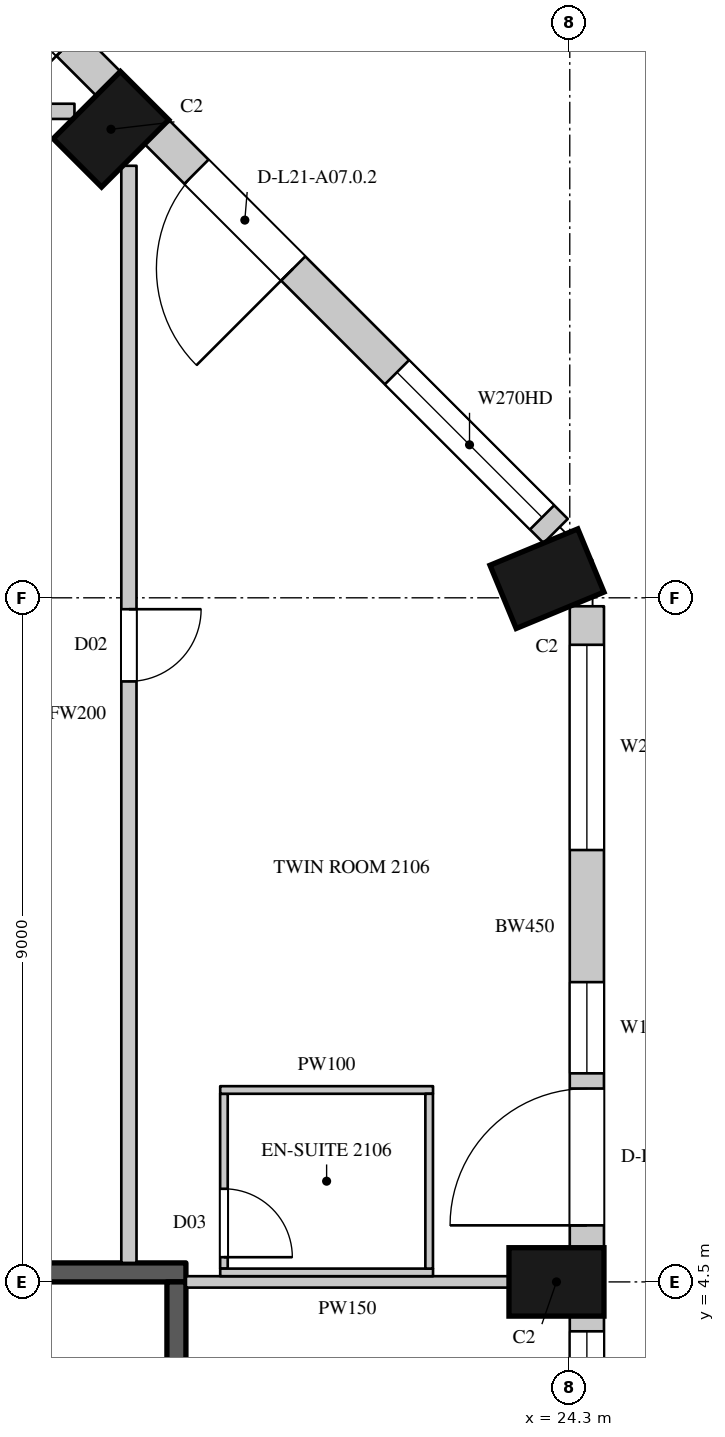
"""IFC4 building model, lengths in metres.
Left out: names, types, materials, properties, quantities, classifications, styles, units other than length and angle.
Written with IfcOpenShell. Run it as: python <this file> out.ifc"""

import sys

from ifc_helpers import new_model, si_unit, direction, frame, frame_2d, origin, origin_2d, place, context, subcontext, project, spatial, rectangle, extrude, element, fill, save


model = new_model("IFC4")
c1 = context("Model", 3, precision=1e-05, world=origin(), true_north=direction((0.0, 1.0)))
c2 = subcontext(c1, "Body", "Model", "MODEL_VIEW")
j1 = project(units=[si_unit("LENGTHUNIT", "METRE"), si_unit("PLANEANGLEUNIT", "RADIAN")], contexts=[c1])
p1 = place(None, origin())
s1 = spatial("IfcSite", under=j1, at=p1, CompositionType="ELEMENT")
p2 = place(p1, origin())
s2 = spatial("IfcBuilding", under=s1, at=p2, CompositionType="ELEMENT")
p3 = place(p2, frame((0.0, 0.0, 105.9)))
s3 = spatial("IfcBuildingStorey", under=s2, at=p3, CompositionType="ELEMENT", Elevation=105.9)
for number, where, z_axis, x_axis in (
    (1, (24.125, 4.5, 0.0), (0.0, 0.0, 1.0), (0.0, 1.0, 0.0)),
    (2, (24.0, 13.752, 0.0), (0.0, 0.0, 1.0), (-0.383, 0.924, 0.0)),
    (3, (18.264, 19.664, 0.0), (0.0, 0.0, 1.0), (-0.707, 0.707, 0.0)),
):
    element("IfcColumn", number, at=place(p3, frame(where, z_axis=z_axis, x_axis=x_axis)), inside=s3, PredefinedType="COLUMN", context=c2, shape_type="SweptSolid", body=[
        extrude(rectangle(XDim=0.9, YDim=1.25, at=origin_2d()), origin(), (0.0, 0.0, 1.0), 3.6),
    ])
p4 = place(p3, frame((24.525, -4.05, 0.0), z_axis=(0.0, 0.0, 1.0), x_axis=(0.0, 1.0, 0.0)))
e4 = element("IfcWall", 4, at=p4, inside=s3, PredefinedType="SOLIDWALL", context=c2, shape_type="SweptSolid", body=[
    extrude(rectangle(XDim=8.1, YDim=0.45, at=frame_2d((4.05, 0.0))), origin(), (0.0, 0.0, 1.0), 3.3),
])
p5 = place(p4, frame((0.2, 0.0, 0.0)))
e5 = element("IfcOpeningElement", 5, at=p5, cuts=e4, PredefinedType="OPENING", context=c2, shape_type="SweptSolid", body=[
    extrude(rectangle(XDim=1.8, YDim=2.4, at=frame_2d((0.9, 1.2))), frame((0.0, 0.235, 0.0), z_axis=(0.0, -1.0, 0.0), x_axis=(1.0, 0.0, 0.0)), (0.0, 0.0, 1.0), 0.47),
])
p6 = place(p4, frame((2.2, 0.0, 1.05)))
e6 = element("IfcOpeningElement", 6, at=p6, cuts=e4, PredefinedType="OPENING", context=c2, shape_type="SweptSolid", body=[
    extrude(rectangle(XDim=1.2, YDim=2.0, at=frame_2d((0.6, 1.0))), frame((0.0, 0.235, 0.0), z_axis=(0.0, -1.0, 0.0), x_axis=(1.0, 0.0, 0.0)), (0.0, 0.0, 1.0), 0.47),
])
p7 = place(p4, frame((4.7, 0.0, 0.0)))
e7 = element("IfcOpeningElement", 7, at=p7, cuts=e4, PredefinedType="OPENING", context=c2, shape_type="SweptSolid", body=[
    extrude(rectangle(XDim=1.8, YDim=2.4, at=frame_2d((0.9, 1.2))), frame((0.0, 0.235, 0.0), z_axis=(0.0, -1.0, 0.0), x_axis=(1.0, 0.0, 0.0)), (0.0, 0.0, 1.0), 0.47),
])
p8 = place(p4, frame((6.7, 0.0, 1.05)))
e8 = element("IfcOpeningElement", 8, at=p8, cuts=e4, PredefinedType="OPENING", context=c2, shape_type="SweptSolid", body=[
    extrude(rectangle(XDim=1.2, YDim=2.0, at=frame_2d((0.6, 1.0))), frame((0.0, 0.235, 0.0), z_axis=(0.0, -1.0, 0.0), x_axis=(1.0, 0.0, 0.0)), (0.0, 0.0, 1.0), 0.47),
])
p9 = place(p3, frame((24.525, 4.95, 0.0), z_axis=(0.0, 0.0, 1.0), x_axis=(0.0, 1.0, 0.0)))
e9 = element("IfcWall", 9, at=p9, inside=s3, PredefinedType="SOLIDWALL", context=c2, shape_type="SweptSolid", body=[
    extrude(rectangle(XDim=8.439, YDim=0.45, at=frame_2d((4.219, 0.0))), origin(), (0.0, 0.0, 1.0), 3.3),
])
p10 = place(p9, frame((0.294, 0.0, 0.0)))
e10 = element("IfcOpeningElement", 10, at=p10, cuts=e9, PredefinedType="OPENING", context=c2, shape_type="SweptSolid", body=[
    extrude(rectangle(XDim=1.8, YDim=2.4, at=frame_2d((0.9, 1.2))), frame((0.0, 0.235, 0.0), z_axis=(0.0, -1.0, 0.0), x_axis=(1.0, 0.0, 0.0)), (0.0, 0.0, 1.0), 0.47),
])
p11 = place(p9, frame((2.294, 0.0, 1.05)))
e11 = element("IfcOpeningElement", 11, at=p11, cuts=e9, PredefinedType="OPENING", context=c2, shape_type="SweptSolid", body=[
    extrude(rectangle(XDim=1.2, YDim=2.0, at=frame_2d((0.6, 1.0))), frame((0.0, 0.235, 0.0), z_axis=(0.0, -1.0, 0.0), x_axis=(1.0, 0.0, 0.0)), (0.0, 0.0, 1.0), 0.47),
])
p12 = place(p9, frame((5.232, 0.0, 1.05)))
e12 = element("IfcOpeningElement", 12, at=p12, cuts=e9, PredefinedType="OPENING", context=c2, shape_type="SweptSolid", body=[
    extrude(rectangle(XDim=2.7, YDim=2.0, at=frame_2d((1.35, 1.0))), frame((0.0, 0.235, 0.0), z_axis=(0.0, -1.0, 0.0), x_axis=(1.0, 0.0, 0.0)), (0.0, 0.0, 1.0), 0.47),
])
p13 = place(p3, frame((24.115, 14.379, 0.0), z_axis=(0.0, 0.0, 1.0), x_axis=(-0.707106781187, 0.707106781187, 0.0)))
e13 = element("IfcWall", 13, at=p13, inside=s3, PredefinedType="SOLIDWALL", context=c2, shape_type="SweptSolid", body=[
    extrude(rectangle(XDim=7.424, YDim=0.45, at=frame_2d((3.712, 0.0))), origin(), (0.0, 0.0, 1.0), 3.3),
])
p14 = place(p13, frame((0.253, 0.0, 1.05)))
e14 = element("IfcOpeningElement", 14, at=p14, cuts=e13, PredefinedType="OPENING", context=c2, shape_type="SweptSolid", body=[
    extrude(rectangle(XDim=2.7, YDim=2.0, at=frame_2d((1.35, 1.0))), frame((0.0, 0.235, 0.0), z_axis=(0.0, -1.0, 0.0), x_axis=(1.0, 0.0, 0.0)), (0.0, 0.0, 1.0), 0.47),
])
p15 = place(p13, frame((4.884, 0.0, 0.0)))
e15 = element("IfcOpeningElement", 15, at=p15, cuts=e13, PredefinedType="OPENING", context=c2, shape_type="SweptSolid", body=[
    extrude(rectangle(XDim=1.8, YDim=2.4, at=frame_2d((0.9, 1.2))), frame((0.0, 0.235, 0.0), z_axis=(0.0, -1.0, 0.0), x_axis=(1.0, 0.0, 0.0)), (0.0, 0.0, 1.0), 0.47),
])
p16 = place(p3, frame((18.229, 20.265, 0.0), z_axis=(0.0, 0.0, 1.0), x_axis=(-0.707106781187, 0.707106781187, 0.0)))
e16 = element("IfcWall", 16, at=p16, inside=s3, PredefinedType="SOLIDWALL", context=c2, shape_type="SweptSolid", body=[
    extrude(rectangle(XDim=7.424, YDim=0.45, at=frame_2d((3.712, 0.0))), origin(), (0.0, 0.0, 1.0), 3.3),
])
p17 = place(p16, frame((0.74, 0.0, 0.0)))
e17 = element("IfcOpeningElement", 17, at=p17, cuts=e16, PredefinedType="OPENING", context=c2, shape_type="SweptSolid", body=[
    extrude(rectangle(XDim=1.8, YDim=2.4, at=frame_2d((0.9, 1.2))), frame((0.0, 0.235, 0.0), z_axis=(0.0, -1.0, 0.0), x_axis=(1.0, 0.0, 0.0)), (0.0, 0.0, 1.0), 0.47),
])
p18 = place(p16, frame((4.471, 0.0, 1.05)))
e18 = element("IfcOpeningElement", 18, at=p18, cuts=e16, PredefinedType="OPENING", context=c2, shape_type="SweptSolid", body=[
    extrude(rectangle(XDim=2.7, YDim=2.0, at=frame_2d((1.35, 1.0))), frame((0.0, 0.235, 0.0), z_axis=(0.0, -1.0, 0.0), x_axis=(1.0, 0.0, 0.0)), (0.0, 0.0, 1.0), 0.47),
])
p19 = place(p3, frame((23.15, 16.864, 0.0), z_axis=(0.0, 0.0, 1.0), x_axis=(-0.707106781187, 0.707106781187, 0.0)))
e19 = element("IfcWall", 19, at=p19, inside=s3, PredefinedType="SOLIDWALL", context=c2, shape_type="SweptSolid", body=[
    extrude(rectangle(XDim=1.445, YDim=0.45, at=frame_2d((0.722, 0.0))), origin(), (0.0, 0.0, 1.0), 0.6),
])
p20 = place(p3, frame((19.937, 20.078, 0.0), z_axis=(0.0, 0.0, 1.0), x_axis=(-0.707106781187, 0.707106781187, 0.0)))
e20 = element("IfcWall", 20, at=p20, inside=s3, PredefinedType="SOLIDWALL", context=c2, shape_type="SweptSolid", body=[
    extrude(rectangle(XDim=1.781, YDim=0.45, at=frame_2d((0.89, 0.0))), origin(), (0.0, 0.0, 1.0), 0.6),
])
p21 = place(p3, frame((-23.822, 19.9, 0.0), z_axis=(0.0, 0.0, 1.0), x_axis=(1.0, 0.0, 0.0)))
e21 = element("IfcWall", 21, at=p21, inside=s3, PredefinedType="PARTITIONING", context=c2, shape_type="SweptSolid", body=[
    extrude(rectangle(XDim=41.605, YDim=0.2, at=frame_2d((20.803, 0.0))), origin(), (0.0, 0.0, 1.0), 3.3),
])
p22 = place(p21, frame((14.25, 0.0, 0.0)))
e22 = element("IfcOpeningElement", 22, at=p22, cuts=e21, PredefinedType="OPENING", context=c2, shape_type="SweptSolid", body=[
    extrude(rectangle(XDim=0.9, YDim=2.2, at=frame_2d((0.45, 1.1))), frame((0.0, 0.11, 0.0), z_axis=(0.0, -1.0, 0.0), x_axis=(1.0, 0.0, 0.0)), (0.0, 0.0, 1.0), 0.22),
])
p23 = place(p21, frame((27.1, 0.0, 0.0)))
e23 = element("IfcOpeningElement", 23, at=p23, cuts=e21, PredefinedType="OPENING", context=c2, shape_type="SweptSolid", body=[
    extrude(rectangle(XDim=0.9, YDim=2.2, at=frame_2d((0.45, 1.1))), frame((0.0, 0.11, 0.0), z_axis=(0.0, -1.0, 0.0), x_axis=(1.0, 0.0, 0.0)), (0.0, 0.0, 1.0), 0.22),
])
p24 = place(p21, frame((0.8, 0.0, 0.0)))
e24 = element("IfcOpeningElement", 24, at=p24, cuts=e21, PredefinedType="OPENING", context=c2, shape_type="SweptSolid", body=[
    extrude(rectangle(XDim=1.1, YDim=2.4, at=frame_2d((0.55, 1.2))), frame((0.0, 0.11, 0.0), z_axis=(0.0, -1.0, 0.0), x_axis=(1.0, 0.0, 0.0)), (0.0, 0.0, 1.0), 0.22),
])
p25 = place(p21, frame((23.2, 0.0, 0.0)))
e25 = element("IfcOpeningElement", 25, at=p25, cuts=e21, PredefinedType="OPENING", context=c2, shape_type="SweptSolid", body=[
    extrude(rectangle(XDim=0.95, YDim=2.2, at=frame_2d((0.475, 1.1))), frame((0.0, 0.11, 0.0), z_axis=(0.0, -1.0, 0.0), x_axis=(1.0, 0.0, 0.0)), (0.0, 0.0, 1.0), 0.22),
])
p26 = place(p21, frame((35.0, 0.0, 0.0)))
e26 = element("IfcOpeningElement", 26, at=p26, cuts=e21, PredefinedType="OPENING", context=c2, shape_type="SweptSolid", body=[
    extrude(rectangle(XDim=0.95, YDim=2.2, at=frame_2d((0.475, 1.1))), frame((0.0, 0.11, 0.0), z_axis=(0.0, -1.0, 0.0), x_axis=(1.0, 0.0, 0.0)), (0.0, 0.0, 1.0), 0.22),
])
p27 = place(p3, frame((18.5, 4.75, 0.0), z_axis=(0.0, 0.0, 1.0), x_axis=(0.0, 1.0, 0.0)))
e27 = element("IfcWall", 27, at=p27, inside=s3, PredefinedType="PARTITIONING", context=c2, shape_type="SweptSolid", body=[
    extrude(rectangle(XDim=14.434, YDim=0.2, at=frame_2d((7.217, 0.0))), origin(), (0.0, 0.0, 1.0), 3.3),
])
p28 = place(p27, frame((7.65, 0.0, 0.0)))
e28 = element("IfcOpeningElement", 28, at=p28, cuts=e27, PredefinedType="OPENING", context=c2, shape_type="SweptSolid", body=[
    extrude(rectangle(XDim=0.95, YDim=2.2, at=frame_2d((0.475, 1.1))), frame((0.0, 0.11, 0.0), z_axis=(0.0, -1.0, 0.0), x_axis=(1.0, 0.0, 0.0)), (0.0, 0.0, 1.0), 0.22),
])
p29 = place(p3, frame((19.25, 4.5, 0.0), z_axis=(0.0, 0.0, 1.0), x_axis=(1.0, 0.0, 0.0)))
e29 = element("IfcWall", 29, at=p29, inside=s3, PredefinedType="PARTITIONING", context=c2, shape_type="SweptSolid", body=[
    extrude(rectangle(XDim=4.25, YDim=0.15, at=frame_2d((2.125, 0.0))), origin(), (0.0, 0.0, 1.0), 3.3),
])
p30 = place(p3, frame((14.55, 4.625, 0.0), z_axis=(0.0, 0.0, 1.0), x_axis=(1.0, 0.0, 0.0)))
e30 = element("IfcWall", 30, at=p30, inside=s3, PredefinedType="SHEAR", context=c2, shape_type="SweptSolid", body=[
    extrude(rectangle(XDim=4.7, YDim=0.25, at=frame_2d((2.35, 0.0))), origin(), (0.0, 0.0, 1.0), 3.3),
])
p31 = place(p3, frame((19.125, -4.5, 0.0), z_axis=(0.0, 0.0, 1.0), x_axis=(0.0, 1.0, 0.0)))
e31 = element("IfcWall", 31, at=p31, inside=s3, PredefinedType="SHEAR", context=c2, shape_type="SweptSolid", body=[
    extrude(rectangle(XDim=9.0, YDim=0.25, at=frame_2d((4.5, 0.0))), origin(), (0.0, 0.0, 1.0), 3.3),
])
p32 = place(p3, frame((19.75, 4.675, 0.0), z_axis=(0.0, 0.0, 1.0), x_axis=(0.0, 1.0, 0.0)))
e32 = element("IfcWall", 32, at=p32, inside=s3, PredefinedType="PARTITIONING", context=c2, shape_type="SweptSolid", body=[
    extrude(rectangle(XDim=2.3, YDim=0.1, at=frame_2d((1.15, 0.0))), origin(), (0.0, 0.0, 1.0), 3.3),
])
p33 = place(p32, frame((0.15, 0.0, 0.0)))
e33 = element("IfcOpeningElement", 33, at=p33, cuts=e32, PredefinedType="OPENING", context=c2, shape_type="SweptSolid", body=[
    extrude(rectangle(XDim=0.9, YDim=2.2, at=frame_2d((0.45, 1.1))), frame((0.0, 0.06, 0.0), z_axis=(0.0, -1.0, 0.0), x_axis=(1.0, 0.0, 0.0)), (0.0, 0.0, 1.0), 0.12),
])
for number, where, z_axis, x_axis in (
    (34, (19.701, 4.625, 0.0), (0.0, 0.0, 1.0), (1.0, 0.0, 0.0)),
    (35, (19.701, 7.025, 0.0), (0.0, 0.0, 1.0), (1.0, 0.0, 0.0)),
):
    element("IfcWall", number, at=place(p3, frame(where, z_axis=z_axis, x_axis=x_axis)), inside=s3, PredefinedType="PARTITIONING", context=c2, shape_type="SweptSolid", body=[
        extrude(rectangle(XDim=2.8, YDim=0.1, at=frame_2d((1.4, 0.0))), origin(), (0.0, 0.0, 1.0), 3.3),
    ])
p34 = place(p3, frame((22.45, 4.675, 0.0), z_axis=(0.0, 0.0, 1.0), x_axis=(0.0, 1.0, 0.0)))
e36 = element("IfcWall", 36, at=p34, inside=s3, PredefinedType="PARTITIONING", context=c2, shape_type="SweptSolid", body=[
    extrude(rectangle(XDim=2.3, YDim=0.1, at=frame_2d((1.15, 0.0))), origin(), (0.0, 0.0, 1.0), 3.3),
])
p35 = place(p8, origin())
e37 = element("IfcWindow", 37, at=p35, inside=s3, PartitioningType="SINGLE_PANEL", PredefinedType="WINDOW", context=c2, shape_type="SweptSolid", body=[
    extrude(rectangle(XDim=1.2, YDim=2.0, at=frame_2d((0.6, 1.0))), frame((0.0, 0.135, 0.0), z_axis=(0.0, -1.0, 0.0), x_axis=(1.0, 0.0, 0.0)), (0.0, 0.0, 1.0), 0.06),
])
fill(e8, e37)
p36 = place(p10, origin())
e38 = element("IfcDoor", 38, at=p36, inside=s3, OperationType="SLIDING_TO_LEFT", PredefinedType="DOOR", context=c2, shape_type="SweptSolid", body=[
    extrude(rectangle(XDim=1.8, YDim=2.4, at=frame_2d((0.9, 1.2))), frame((0.0, 0.13, 0.0), z_axis=(0.0, -1.0, 0.0), x_axis=(1.0, 0.0, 0.0)), (0.0, 0.0, 1.0), 0.05),
])
fill(e10, e38)
p37 = place(p11, origin())
e39 = element("IfcWindow", 39, at=p37, inside=s3, PartitioningType="SINGLE_PANEL", PredefinedType="WINDOW", context=c2, shape_type="SweptSolid", body=[
    extrude(rectangle(XDim=1.2, YDim=2.0, at=frame_2d((0.6, 1.0))), frame((0.0, 0.135, 0.0), z_axis=(0.0, -1.0, 0.0), x_axis=(1.0, 0.0, 0.0)), (0.0, 0.0, 1.0), 0.06),
])
fill(e11, e39)
p38 = place(p12, origin())
e40 = element("IfcWindow", 40, at=p38, inside=s3, PartitioningType="SINGLE_PANEL", PredefinedType="WINDOW", context=c2, shape_type="SweptSolid", body=[
    extrude(rectangle(XDim=2.7, YDim=2.0, at=frame_2d((1.35, 1.0))), frame((0.0, 0.135, 0.0), z_axis=(0.0, -1.0, 0.0), x_axis=(1.0, 0.0, 0.0)), (0.0, 0.0, 1.0), 0.06),
])
fill(e12, e40)
p39 = place(p14, origin())
e41 = element("IfcWindow", 41, at=p39, inside=s3, PartitioningType="SINGLE_PANEL", PredefinedType="WINDOW", context=c2, shape_type="SweptSolid", body=[
    extrude(rectangle(XDim=2.7, YDim=2.0, at=frame_2d((1.35, 1.0))), frame((0.0, 0.135, 0.0), z_axis=(0.0, -1.0, 0.0), x_axis=(1.0, 0.0, 0.0)), (0.0, 0.0, 1.0), 0.06),
])
fill(e14, e41)
p40 = place(p15, origin())
e42 = element("IfcDoor", 42, at=p40, inside=s3, OperationType="SLIDING_TO_LEFT", PredefinedType="DOOR", context=c2, shape_type="SweptSolid", body=[
    extrude(rectangle(XDim=1.8, YDim=2.4, at=frame_2d((0.9, 1.2))), frame((0.0, 0.13, 0.0), z_axis=(0.0, -1.0, 0.0), x_axis=(1.0, 0.0, 0.0)), (0.0, 0.0, 1.0), 0.05),
])
fill(e15, e42)
p41 = place(p28, origin())
e43 = element("IfcDoor", 43, at=p41, inside=s3, OperationType="SINGLE_SWING_LEFT", PredefinedType="DOOR", context=c2, shape_type="SweptSolid", body=[
    extrude(rectangle(XDim=0.95, YDim=2.2, at=frame_2d((0.475, 1.1))), frame((0.0, 0.025, 0.0), z_axis=(0.0, -1.0, 0.0), x_axis=(1.0, 0.0, 0.0)), (0.0, 0.0, 1.0), 0.05),
])
fill(e28, e43)
p42 = place(p33, origin())
e44 = element("IfcDoor", 44, at=p42, inside=s3, OperationType="SINGLE_SWING_RIGHT", PredefinedType="DOOR", context=c2, shape_type="SweptSolid", body=[
    extrude(rectangle(XDim=0.9, YDim=2.2, at=frame_2d((0.45, 1.1))), frame((0.0, 0.025, 0.0), z_axis=(0.0, -1.0, 0.0), x_axis=(1.0, 0.0, 0.0)), (0.0, 0.0, 1.0), 0.05),
])
fill(e33, e44)
save(model, sys.argv[1])
